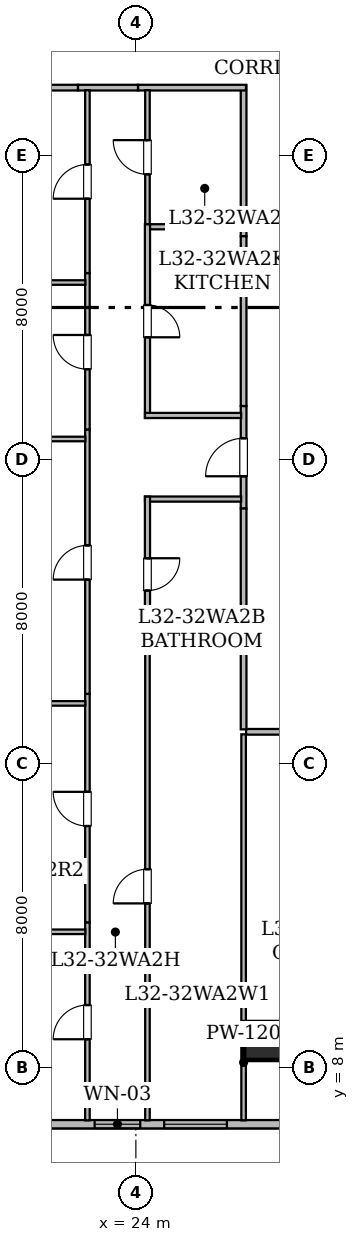
"""IFC4 building model, lengths in metres.
Left out: names, types, materials, properties, quantities, classifications, styles, units other than length and angle.
Written with IfcOpenShell. Run it as: python <this file> out.ifc"""

import sys

from ifc_helpers import new_model, si_unit, direction, frame, frame_2d, origin, origin_2d, place, context, subcontext, project, spatial, rectangle, hollow_rectangle, extrude, element, fill, save


model = new_model("IFC4")
c1 = context("Model", 3, precision=1e-05, world=origin(), true_north=direction((0.0, 1.0)))
c2 = subcontext(c1, "Body", "Model", "MODEL_VIEW")
j1 = project(units=[si_unit("LENGTHUNIT", "METRE"), si_unit("PLANEANGLEUNIT", "RADIAN")], contexts=[c1])
p1 = place(None, origin())
s1 = spatial("IfcSite", under=j1, at=p1, CompositionType="ELEMENT")
p2 = place(p1, origin())
s2 = spatial("IfcBuilding", under=s1, at=p2, CompositionType="ELEMENT")
p3 = place(p2, frame((0.0, 0.0, 127.45)))
s3 = spatial("IfcBuildingStorey", under=s2, at=p3, CompositionType="ELEMENT", Elevation=127.45)
p4 = place(p3, frame((27.35, 8.7, 0.0), z_axis=(0.0, 0.0, 1.0), x_axis=(1.0, 0.0, 0.0)))
e1 = element("IfcColumn", 1, at=p4, inside=s3, PredefinedType="COLUMN", context=c2, shape_type="SweptSolid", body=[
    extrude(hollow_rectangle(XDim=1.0, YDim=1.0, WallThickness=0.05, at=origin_2d()), origin(), (0.0, 0.0, 1.0), 3.65),
])
p5 = place(p3, frame((52.283, 6.51, 0.0), z_axis=(0.0, 0.0, 1.0), x_axis=(-1.0, 0.0, 0.0)))
e2 = element("IfcWall", 2, at=p5, inside=s3, PredefinedType="STANDARD", context=c2, shape_type="SweptSolid", body=[
    extrude(rectangle(XDim=38.568, YDim=0.22, at=frame_2d((19.284, 0.0))), origin(), (0.0, 0.0, 1.0), 3.43),
])
p6 = place(p5, frame((20.408, 0.0, 0.85)))
e3 = element("IfcOpeningElement", 3, at=p6, cuts=e2, PredefinedType="OPENING", context=c2, shape_type="SweptSolid", body=[
    extrude(rectangle(XDim=1.65, YDim=1.55, at=frame_2d((0.825, 0.775))), frame((0.0, 0.12, 0.0), z_axis=(0.0, -1.0, 0.0), x_axis=(1.0, 0.0, 0.0)), (0.0, 0.0, 1.0), 0.24),
])
p7 = place(p5, frame((35.483, 0.0, 0.85)))
e4 = element("IfcOpeningElement", 4, at=p7, cuts=e2, PredefinedType="OPENING", context=c2, shape_type="SweptSolid", body=[
    extrude(rectangle(XDim=1.65, YDim=1.55, at=frame_2d((0.825, 0.775))), frame((0.0, 0.12, 0.0), z_axis=(0.0, -1.0, 0.0), x_axis=(1.0, 0.0, 0.0)), (0.0, 0.0, 1.0), 0.24),
])
p8 = place(p5, frame((25.888, 0.0, 0.85)))
e5 = element("IfcOpeningElement", 5, at=p8, cuts=e2, PredefinedType="OPENING", context=c2, shape_type="SweptSolid", body=[
    extrude(rectangle(XDim=1.65, YDim=1.55, at=frame_2d((0.825, 0.775))), frame((0.0, 0.12, 0.0), z_axis=(0.0, -1.0, 0.0), x_axis=(1.0, 0.0, 0.0)), (0.0, 0.0, 1.0), 0.24),
])
p9 = place(p5, frame((28.168, 0.0, 0.8)))
e6 = element("IfcOpeningElement", 6, at=p9, cuts=e2, PredefinedType="OPENING", context=c2, shape_type="SweptSolid", body=[
    extrude(rectangle(XDim=1.2, YDim=1.5, at=frame_2d((0.6, 0.75))), frame((0.0, 0.12, 0.0), z_axis=(0.0, -1.0, 0.0), x_axis=(1.0, 0.0, 0.0)), (0.0, 0.0, 1.0), 0.24),
])
p10 = place(p5, frame((31.371, 0.0, 0.85)))
e7 = element("IfcOpeningElement", 7, at=p10, cuts=e2, PredefinedType="OPENING", context=c2, shape_type="SweptSolid", body=[
    extrude(rectangle(XDim=1.65, YDim=1.55, at=frame_2d((0.825, 0.775))), frame((0.0, 0.12, 0.0), z_axis=(0.0, -1.0, 0.0), x_axis=(1.0, 0.0, 0.0)), (0.0, 0.0, 1.0), 0.24),
])
p11 = place(p5, frame((13.143, 0.0, 0.85)))
e8 = element("IfcOpeningElement", 8, at=p11, cuts=e2, PredefinedType="OPENING", context=c2, shape_type="SweptSolid", body=[
    extrude(rectangle(XDim=1.65, YDim=1.55, at=frame_2d((0.825, 0.775))), frame((0.0, 0.12, 0.0), z_axis=(0.0, -1.0, 0.0), x_axis=(1.0, 0.0, 0.0)), (0.0, 0.0, 1.0), 0.24),
])
p12 = place(p5, frame((6.688, 0.0, 0.85)))
e9 = element("IfcOpeningElement", 9, at=p12, cuts=e2, PredefinedType="OPENING", context=c2, shape_type="SweptSolid", body=[
    extrude(rectangle(XDim=1.65, YDim=1.55, at=frame_2d((0.825, 0.775))), frame((0.0, 0.12, 0.0), z_axis=(0.0, -1.0, 0.0), x_axis=(1.0, 0.0, 0.0)), (0.0, 0.0, 1.0), 0.24),
])
p13 = place(p3, frame((35.514, 16.835, 0.0), z_axis=(0.0, 0.0, 1.0), x_axis=(-1.0, 0.0, 0.0)))
e10 = element("IfcWall", 10, at=p13, inside=s3, PredefinedType="STANDARD", context=c2, shape_type="SweptSolid", body=[
    extrude(rectangle(XDim=8.614, YDim=0.15, at=frame_2d((4.307, 0.0))), origin(), (0.0, 0.0, 1.0), 2.647),
])
p14 = place(p13, frame((3.753, 0.0, 0.0)))
e11 = element("IfcOpeningElement", 11, at=p14, cuts=e10, PredefinedType="OPENING", context=c2, shape_type="SweptSolid", body=[
    extrude(rectangle(XDim=1.15, YDim=2.2, at=frame_2d((0.575, 1.1))), frame((0.0, 0.085, 0.0), z_axis=(0.0, -1.0, 0.0), x_axis=(1.0, 0.0, 0.0)), (0.0, 0.0, 1.0), 0.17),
])
p15 = place(p3, frame((26.835, 16.9, 0.0), z_axis=(0.0, 0.0, 1.0), x_axis=(0.0, 1.0, 0.0)))
e12 = element("IfcWall", 12, at=p15, inside=s3, PredefinedType="STANDARD", context=c2, shape_type="SweptSolid", body=[
    extrude(rectangle(XDim=2.343, YDim=0.15, at=frame_2d((1.171, 0.0))), origin(), (0.0, 0.0, 1.0), 2.647),
])
p16 = place(p3, frame((26.835, 29.875, 0.0), z_axis=(0.0, 0.0, 1.0), x_axis=(0.0, 1.0, 0.0)))
e13 = element("IfcWall", 13, at=p16, inside=s3, PredefinedType="STANDARD", context=c2, shape_type="SweptSolid", body=[
    extrude(rectangle(XDim=3.975, YDim=0.15, at=frame_2d((1.988, 0.0))), origin(), (0.0, 0.0, 1.0), 3.43),
])
p17 = place(p3, frame((26.898, 33.785, 0.0), z_axis=(0.0, 0.0, 1.0), x_axis=(-1.0, 0.0, 0.0)))
e14 = element("IfcWall", 14, at=p17, inside=s3, PredefinedType="STANDARD", context=c2, shape_type="SweptSolid", body=[
    extrude(rectangle(XDim=2.842, YDim=0.15, at=frame_2d((1.421, 0.0))), origin(), (0.0, 0.0, 1.0), 3.43),
])
p18 = place(p3, frame((26.835, 22.71, 0.0), z_axis=(0.0, 0.0, 1.0), x_axis=(0.0, 1.0, 0.0)))
e15 = element("IfcWall", 15, at=p18, inside=s3, PredefinedType="STANDARD", context=c2, shape_type="SweptSolid", body=[
    extrude(rectangle(XDim=2.698, YDim=0.15, at=frame_2d((1.349, 0.0))), origin(), (0.0, 0.0, 1.0), 3.43),
])
p19 = place(p18, frame((0.849, 0.0, 0.0)))
e16 = element("IfcOpeningElement", 16, at=p19, cuts=e15, PredefinedType="OPENING", context=c2, shape_type="SweptSolid", body=[
    extrude(rectangle(XDim=1.0, YDim=2.15, at=frame_2d((0.5, 1.075))), frame((0.0, 0.085, 0.0), z_axis=(0.0, -1.0, 0.0), x_axis=(1.0, 0.0, 0.0)), (0.0, 0.0, 1.0), 0.17),
])
p20 = place(p3, frame((24.056, 33.785, 0.0), z_axis=(0.0, 0.0, 1.0), x_axis=(-1.0, 0.0, 0.0)))
e17 = element("IfcWall", 17, at=p20, inside=s3, PredefinedType="STANDARD", context=c2, shape_type="SweptSolid", body=[
    extrude(rectangle(XDim=1.58, YDim=0.15, at=frame_2d((0.79, 0.0))), origin(), (0.0, 0.0, 1.0), 3.43),
])
p21 = place(p3, frame((26.835, 19.243, 0.0), z_axis=(0.0, 0.0, 1.0), x_axis=(0.0, 1.0, 0.0)))
e18 = element("IfcWall", 18, at=p21, inside=s3, PredefinedType="STANDARD", context=c2, shape_type="SweptSolid", body=[
    extrude(rectangle(XDim=3.467, YDim=0.15, at=frame_2d((1.733, 0.0))), origin(), (0.0, 0.0, 1.0), 3.43),
])
p22 = place(p3, frame((26.835, 25.408, 0.0), z_axis=(0.0, 0.0, 1.0), x_axis=(0.0, 1.0, 0.0)))
e19 = element("IfcWall", 19, at=p22, inside=s3, PredefinedType="STANDARD", context=c2, shape_type="SweptSolid", body=[
    extrude(rectangle(XDim=4.467, YDim=0.15, at=frame_2d((2.233, 0.0))), origin(), (0.0, 0.0, 1.0), 3.107),
])
p23 = place(p3, frame((22.476, 33.785, 0.0), z_axis=(0.0, 0.0, 1.0), x_axis=(-1.0, 0.0, 0.0)))
e20 = element("IfcWall", 20, at=p23, inside=s3, PredefinedType="STANDARD", context=c2, shape_type="SweptSolid", body=[
    extrude(rectangle(XDim=4.777, YDim=0.15, at=frame_2d((2.389, 0.0))), origin(), (0.0, 0.0, 1.0), 2.647),
])
p24 = place(p3, frame((26.835, 6.612, 0.0), z_axis=(0.0, 0.0, 1.0), x_axis=(0.0, 1.0, 0.0)))
e21 = element("IfcWall", 21, at=p24, inside=s3, PredefinedType="PARTITIONING", context=c2, shape_type="SweptSolid", body=[
    extrude(rectangle(XDim=10.158, YDim=0.12, at=frame_2d((5.079, 0.0))), origin(), (0.0, 0.0, 1.0), 2.876),
])
p25 = place(p3, frame((24.305, 6.612, 0.0), z_axis=(0.0, 0.0, 1.0), x_axis=(0.0, 1.0, 0.0)))
e22 = element("IfcWall", 22, at=p25, inside=s3, PredefinedType="PARTITIONING", context=c2, shape_type="SweptSolid", body=[
    extrude(rectangle(XDim=12.317, YDim=0.12, at=frame_2d((6.158, 0.0))), origin(), (0.0, 0.0, 1.0), 2.647),
])
p26 = place(p25, frame((5.708, 0.0, 0.0)))
e23 = element("IfcOpeningElement", 23, at=p26, cuts=e22, PredefinedType="OPENING", context=c2, shape_type="SweptSolid", body=[
    extrude(rectangle(XDim=0.9, YDim=2.1, at=frame_2d((0.45, 1.05))), frame((0.0, 0.07, 0.0), z_axis=(0.0, -1.0, 0.0), x_axis=(1.0, 0.0, 0.0)), (0.0, 0.0, 1.0), 0.14),
])
p27 = place(p3, frame((24.37, 18.994, 0.0), z_axis=(0.0, 0.0, 1.0), x_axis=(1.0, 0.0, 0.0)))
e24 = element("IfcWall", 24, at=p27, inside=s3, PredefinedType="PARTITIONING", context=c2, shape_type="SweptSolid", body=[
    extrude(rectangle(XDim=2.4, YDim=0.135, at=frame_2d((1.2, 0.0))), origin(), (0.0, 0.0, 1.0), 2.647),
])
p28 = place(p3, frame((24.305, 30.189, 0.0), z_axis=(0.0, 0.0, 1.0), x_axis=(0.0, 1.0, 0.0)))
e25 = element("IfcWall", 25, at=p28, inside=s3, PredefinedType="PARTITIONING", context=c2, shape_type="SweptSolid", body=[
    extrude(rectangle(XDim=3.529, YDim=0.12, at=frame_2d((1.765, 0.0))), origin(), (0.0, 0.0, 1.0), 3.43),
])
p29 = place(p28, frame((1.315, 0.0, 0.0)))
e26 = element("IfcOpeningElement", 26, at=p29, cuts=e25, PredefinedType="OPENING", context=c2, shape_type="SweptSolid", body=[
    extrude(rectangle(XDim=0.9, YDim=2.1, at=frame_2d((0.45, 1.05))), frame((0.0, 0.07, 0.0), z_axis=(0.0, -1.0, 0.0), x_axis=(1.0, 0.0, 0.0)), (0.0, 0.0, 1.0), 0.14),
])
p30 = place(p3, frame((26.77, 30.124, 0.0), z_axis=(0.0, 0.0, 1.0), x_axis=(-1.0, 0.0, 0.0)))
e27 = element("IfcWall", 27, at=p30, inside=s3, PredefinedType="PARTITIONING", context=c2, shape_type="SweptSolid", body=[
    extrude(rectangle(XDim=2.4, YDim=0.135, at=frame_2d((1.2, 0.0))), origin(), (0.0, 0.0, 1.0), 3.43),
])
p31 = place(p3, frame((26.77, 22.959, 0.0), z_axis=(0.0, 0.0, 1.0), x_axis=(-1.0, 0.0, 0.0)))
e28 = element("IfcWall", 28, at=p31, inside=s3, PredefinedType="PARTITIONING", context=c2, shape_type="SweptSolid", body=[
    extrude(rectangle(XDim=2.53, YDim=0.135, at=frame_2d((1.265, 0.0))), origin(), (0.0, 0.0, 1.0), 3.43),
])
p32 = place(p3, frame((24.305, 23.024, 0.0), z_axis=(0.0, 0.0, 1.0), x_axis=(0.0, -1.0, 0.0)))
e29 = element("IfcWall", 29, at=p32, inside=s3, PredefinedType="PARTITIONING", context=c2, shape_type="SweptSolid", body=[
    extrude(rectangle(XDim=4.095, YDim=0.135, at=frame_2d((2.047, 0.0))), origin(), (0.0, 0.0, 1.0), 3.43),
])
p33 = place(p32, frame((1.622, 0.0, 0.0)))
e30 = element("IfcOpeningElement", 30, at=p33, cuts=e29, PredefinedType="OPENING", context=c2, shape_type="SweptSolid", body=[
    extrude(rectangle(XDim=0.85, YDim=2.1, at=frame_2d((0.425, 1.05))), frame((0.0, 0.077, 0.0), z_axis=(0.0, -1.0, 0.0), x_axis=(1.0, 0.0, 0.0)), (0.0, 0.0, 1.0), 0.155),
])
p34 = place(p3, frame((24.305, 30.189, 0.0), z_axis=(0.0, 0.0, 1.0), x_axis=(0.0, -1.0, 0.0)))
e31 = element("IfcWall", 31, at=p34, inside=s3, PredefinedType="PARTITIONING", context=c2, shape_type="SweptSolid", body=[
    extrude(rectangle(XDim=5.095, YDim=0.135, at=frame_2d((2.547, 0.0))), origin(), (0.0, 0.0, 1.0), 3.107),
])
p35 = place(p34, frame((2.123, 0.0, 0.0)))
e32 = element("IfcOpeningElement", 32, at=p35, cuts=e31, PredefinedType="OPENING", context=c2, shape_type="SweptSolid", body=[
    extrude(rectangle(XDim=0.85, YDim=2.1, at=frame_2d((0.425, 1.05))), frame((0.0, 0.077, 0.0), z_axis=(0.0, -1.0, 0.0), x_axis=(1.0, 0.0, 0.0)), (0.0, 0.0, 1.0), 0.155),
])
p36 = place(p3, frame((24.24, 25.159, 0.0), z_axis=(0.0, 0.0, 1.0), x_axis=(1.0, 0.0, 0.0)))
e33 = element("IfcWall", 33, at=p36, inside=s3, PredefinedType="PARTITIONING", context=c2, shape_type="SweptSolid", body=[
    extrude(rectangle(XDim=2.53, YDim=0.135, at=frame_2d((1.265, 0.0))), origin(), (0.0, 0.0, 1.0), 3.43),
])
p37 = place(p3, frame((22.725, 6.612, 0.0), z_axis=(0.0, 0.0, 1.0), x_axis=(0.0, 1.0, 0.0)))
e34 = element("IfcWall", 34, at=p37, inside=s3, PredefinedType="PARTITIONING", context=c2, shape_type="SweptSolid", body=[
    extrude(rectangle(XDim=5.21, YDim=0.12, at=frame_2d((2.605, 0.0))), origin(), (0.0, 0.0, 1.0), 2.876),
])
p38 = place(p37, frame((2.134, 0.0, 0.0)))
e35 = element("IfcOpeningElement", 35, at=p38, cuts=e34, PredefinedType="OPENING", context=c2, shape_type="SweptSolid", body=[
    extrude(rectangle(XDim=0.9, YDim=2.1, at=frame_2d((0.45, 1.05))), frame((0.0, 0.07, 0.0), z_axis=(0.0, -1.0, 0.0), x_axis=(1.0, 0.0, 0.0)), (0.0, 0.0, 1.0), 0.14),
])
p39 = place(p3, frame((22.725, 11.822, 0.0), z_axis=(0.0, 0.0, 1.0), x_axis=(0.0, 1.0, 0.0)))
e36 = element("IfcWall", 36, at=p39, inside=s3, PredefinedType="PARTITIONING", context=c2, shape_type="SweptSolid", body=[
    extrude(rectangle(XDim=6.011, YDim=0.12, at=frame_2d((3.005, 0.0))), origin(), (0.0, 0.0, 1.0), 3.43),
])
p40 = place(p39, frame((2.534, 0.0, 0.0)))
e37 = element("IfcOpeningElement", 37, at=p40, cuts=e36, PredefinedType="OPENING", context=c2, shape_type="SweptSolid", body=[
    extrude(rectangle(XDim=0.9, YDim=2.1, at=frame_2d((0.45, 1.05))), frame((0.0, 0.07, 0.0), z_axis=(0.0, -1.0, 0.0), x_axis=(1.0, 0.0, 0.0)), (0.0, 0.0, 1.0), 0.14),
])
p41 = place(p3, frame((22.725, 17.833, 0.0), z_axis=(0.0, 0.0, 1.0), x_axis=(0.0, 1.0, 0.0)))
e38 = element("IfcWall", 38, at=p41, inside=s3, PredefinedType="PARTITIONING", context=c2, shape_type="SweptSolid", body=[
    extrude(rectangle(XDim=6.956, YDim=0.12, at=frame_2d((3.478, 0.0))), origin(), (0.0, 0.0, 1.0), 2.647),
])
p42 = place(p41, frame((3.007, 0.0, 0.0)))
e39 = element("IfcOpeningElement", 39, at=p42, cuts=e38, PredefinedType="OPENING", context=c2, shape_type="SweptSolid", body=[
    extrude(rectangle(XDim=0.9, YDim=2.1, at=frame_2d((0.45, 1.05))), frame((0.0, 0.07, 0.0), z_axis=(0.0, -1.0, 0.0), x_axis=(1.0, 0.0, 0.0)), (0.0, 0.0, 1.0), 0.14),
])
p43 = place(p3, frame((22.725, 24.789, 0.0), z_axis=(0.0, 0.0, 1.0), x_axis=(0.0, 1.0, 0.0)))
e40 = element("IfcWall", 40, at=p43, inside=s3, PredefinedType="PARTITIONING", context=c2, shape_type="SweptSolid", body=[
    extrude(rectangle(XDim=4.117, YDim=0.12, at=frame_2d((2.059, 0.0))), origin(), (0.0, 0.0, 1.0), 3.107),
])
p44 = place(p43, frame((1.588, 0.0, 0.0)))
e41 = element("IfcOpeningElement", 41, at=p44, cuts=e40, PredefinedType="OPENING", context=c2, shape_type="SweptSolid", body=[
    extrude(rectangle(XDim=0.9, YDim=2.1, at=frame_2d((0.45, 1.05))), frame((0.0, 0.07, 0.0), z_axis=(0.0, -1.0, 0.0), x_axis=(1.0, 0.0, 0.0)), (0.0, 0.0, 1.0), 0.14),
])
p45 = place(p3, frame((22.725, 28.906, 0.0), z_axis=(0.0, 0.0, 1.0), x_axis=(0.0, 1.0, 0.0)))
e42 = element("IfcWall", 42, at=p45, inside=s3, PredefinedType="PARTITIONING", context=c2, shape_type="SweptSolid", body=[
    extrude(rectangle(XDim=4.812, YDim=0.12, at=frame_2d((2.406, 0.0))), origin(), (0.0, 0.0, 1.0), 3.43),
])
p46 = place(p45, frame((1.956, 0.0, 0.0)))
e43 = element("IfcOpeningElement", 43, at=p46, cuts=e42, PredefinedType="OPENING", context=c2, shape_type="SweptSolid", body=[
    extrude(rectangle(XDim=0.9, YDim=2.1, at=frame_2d((0.45, 1.05))), frame((0.0, 0.07, 0.0), z_axis=(0.0, -1.0, 0.0), x_axis=(1.0, 0.0, 0.0)), (0.0, 0.0, 1.0), 0.14),
])
p47 = place(p3, frame((17.532, 11.573, 0.0), z_axis=(0.0, 0.0, 1.0), x_axis=(1.0, 0.0, 0.0)))
e44 = element("IfcWall", 44, at=p47, inside=s3, PredefinedType="PARTITIONING", context=c2, shape_type="SweptSolid", body=[
    extrude(rectangle(XDim=5.139, YDim=0.12, at=frame_2d((2.569, 0.0))), origin(), (0.0, 0.0, 1.0), 3.43),
])
for number, where, z_axis, x_axis in (
    (45, (17.532, 17.583, 0.0), (0.0, 0.0, 1.0), (1.0, 0.0, 0.0)),
    (46, (17.532, 24.54, 0.0), (0.0, 0.0, 1.0), (1.0, 0.0, 0.0)),
):
    element("IfcWall", number, at=place(p3, frame(where, z_axis=z_axis, x_axis=x_axis)), inside=s3, PredefinedType="PARTITIONING", context=c2, shape_type="SweptSolid", body=[
        extrude(rectangle(XDim=5.139, YDim=0.12, at=frame_2d((2.569, 0.0))), origin(), (0.0, 0.0, 1.0), 2.647),
    ])
p48 = place(p3, frame((17.524, 28.657, 0.0), z_axis=(0.0, 0.0, 1.0), x_axis=(1.0, 0.0, 0.0)))
e47 = element("IfcWall", 47, at=p48, inside=s3, PredefinedType="PARTITIONING", context=c2, shape_type="SweptSolid", body=[
    extrude(rectangle(XDim=5.147, YDim=0.12, at=frame_2d((2.573, 0.0))), origin(), (0.0, 0.0, 1.0), 2.647),
])
p49 = place(p8, origin())
e48 = element("IfcWindow", 48, at=p49, inside=s3, PartitioningType="SINGLE_PANEL", PredefinedType="WINDOW", context=c2, shape_type="SweptSolid", body=[
    extrude(rectangle(XDim=1.65, YDim=1.55, at=frame_2d((0.825, 0.775))), frame((0.0, 0.03, 0.0), z_axis=(0.0, -1.0, 0.0), x_axis=(1.0, 0.0, 0.0)), (0.0, 0.0, 1.0), 0.06),
])
fill(e5, e48)
p50 = place(p9, origin())
e49 = element("IfcWindow", 49, at=p50, inside=s3, PartitioningType="SINGLE_PANEL", PredefinedType="WINDOW", context=c2, shape_type="SweptSolid", body=[
    extrude(rectangle(XDim=1.2, YDim=1.5, at=frame_2d((0.6, 0.75))), frame((0.0, 0.03, 0.0), z_axis=(0.0, -1.0, 0.0), x_axis=(1.0, 0.0, 0.0)), (0.0, 0.0, 1.0), 0.06),
])
fill(e6, e49)
p51 = place(p19, origin())
e50 = element("IfcDoor", 50, at=p51, inside=s3, OperationType="SINGLE_SWING_LEFT", PredefinedType="DOOR", context=c2, shape_type="SweptSolid", body=[
    extrude(rectangle(XDim=1.0, YDim=2.15, at=frame_2d((0.5, 1.075))), frame((0.0, 0.025, 0.0), z_axis=(0.0, -1.0, 0.0), x_axis=(1.0, 0.0, 0.0)), (0.0, 0.0, 1.0), 0.05),
])
fill(e16, e50)
p52 = place(p26, origin())
e51 = element("IfcDoor", 51, at=p52, inside=s3, OperationType="SINGLE_SWING_LEFT", PredefinedType="DOOR", context=c2, shape_type="SweptSolid", body=[
    extrude(rectangle(XDim=0.9, YDim=2.1, at=frame_2d((0.45, 1.05))), frame((0.0, 0.025, 0.0), z_axis=(0.0, -1.0, 0.0), x_axis=(1.0, 0.0, 0.0)), (0.0, 0.0, 1.0), 0.05),
])
fill(e23, e51)
p53 = place(p29, origin())
e52 = element("IfcDoor", 52, at=p53, inside=s3, OperationType="SINGLE_SWING_RIGHT", PredefinedType="DOOR", context=c2, shape_type="SweptSolid", body=[
    extrude(rectangle(XDim=0.9, YDim=2.1, at=frame_2d((0.45, 1.05))), frame((0.0, 0.025, 0.0), z_axis=(0.0, -1.0, 0.0), x_axis=(1.0, 0.0, 0.0)), (0.0, 0.0, 1.0), 0.05),
])
fill(e26, e52)
p54 = place(p33, origin())
e53 = element("IfcDoor", 53, at=p54, inside=s3, OperationType="SINGLE_SWING_LEFT", PredefinedType="DOOR", context=c2, shape_type="SweptSolid", body=[
    extrude(rectangle(XDim=0.85, YDim=2.1, at=frame_2d((0.425, 1.05))), frame((0.0, 0.025, 0.0), z_axis=(0.0, -1.0, 0.0), x_axis=(1.0, 0.0, 0.0)), (0.0, 0.0, 1.0), 0.05),
])
fill(e30, e53)
p55 = place(p35, origin())
e54 = element("IfcDoor", 54, at=p55, inside=s3, OperationType="SINGLE_SWING_RIGHT", PredefinedType="DOOR", context=c2, shape_type="SweptSolid", body=[
    extrude(rectangle(XDim=0.85, YDim=2.1, at=frame_2d((0.425, 1.05))), frame((0.0, 0.025, 0.0), z_axis=(0.0, -1.0, 0.0), x_axis=(1.0, 0.0, 0.0)), (0.0, 0.0, 1.0), 0.05),
])
fill(e32, e54)
p56 = place(p38, origin())
e55 = element("IfcDoor", 55, at=p56, inside=s3, OperationType="SINGLE_SWING_LEFT", PredefinedType="DOOR", context=c2, shape_type="SweptSolid", body=[
    extrude(rectangle(XDim=0.9, YDim=2.1, at=frame_2d((0.45, 1.05))), frame((0.0, 0.025, 0.0), z_axis=(0.0, -1.0, 0.0), x_axis=(1.0, 0.0, 0.0)), (0.0, 0.0, 1.0), 0.05),
])
fill(e35, e55)
p57 = place(p40, origin())
e56 = element("IfcDoor", 56, at=p57, inside=s3, OperationType="SINGLE_SWING_RIGHT", PredefinedType="DOOR", context=c2, shape_type="SweptSolid", body=[
    extrude(rectangle(XDim=0.9, YDim=2.1, at=frame_2d((0.45, 1.05))), frame((0.0, 0.025, 0.0), z_axis=(0.0, -1.0, 0.0), x_axis=(1.0, 0.0, 0.0)), (0.0, 0.0, 1.0), 0.05),
])
fill(e37, e56)
p58 = place(p42, origin())
e57 = element("IfcDoor", 57, at=p58, inside=s3, OperationType="SINGLE_SWING_LEFT", PredefinedType="DOOR", context=c2, shape_type="SweptSolid", body=[
    extrude(rectangle(XDim=0.9, YDim=2.1, at=frame_2d((0.45, 1.05))), frame((0.0, 0.025, 0.0), z_axis=(0.0, -1.0, 0.0), x_axis=(1.0, 0.0, 0.0)), (0.0, 0.0, 1.0), 0.05),
])
fill(e39, e57)
p59 = place(p44, origin())
e58 = element("IfcDoor", 58, at=p59, inside=s3, OperationType="SINGLE_SWING_RIGHT", PredefinedType="DOOR", context=c2, shape_type="SweptSolid", body=[
    extrude(rectangle(XDim=0.9, YDim=2.1, at=frame_2d((0.45, 1.05))), frame((0.0, 0.025, 0.0), z_axis=(0.0, -1.0, 0.0), x_axis=(1.0, 0.0, 0.0)), (0.0, 0.0, 1.0), 0.05),
])
fill(e41, e58)
p60 = place(p46, origin())
e59 = element("IfcDoor", 59, at=p60, inside=s3, OperationType="SINGLE_SWING_LEFT", PredefinedType="DOOR", context=c2, shape_type="SweptSolid", body=[
    extrude(rectangle(XDim=0.9, YDim=2.1, at=frame_2d((0.45, 1.05))), frame((0.0, 0.025, 0.0), z_axis=(0.0, -1.0, 0.0), x_axis=(1.0, 0.0, 0.0)), (0.0, 0.0, 1.0), 0.05),
])
fill(e43, e59)
save(model, sys.argv[1])
